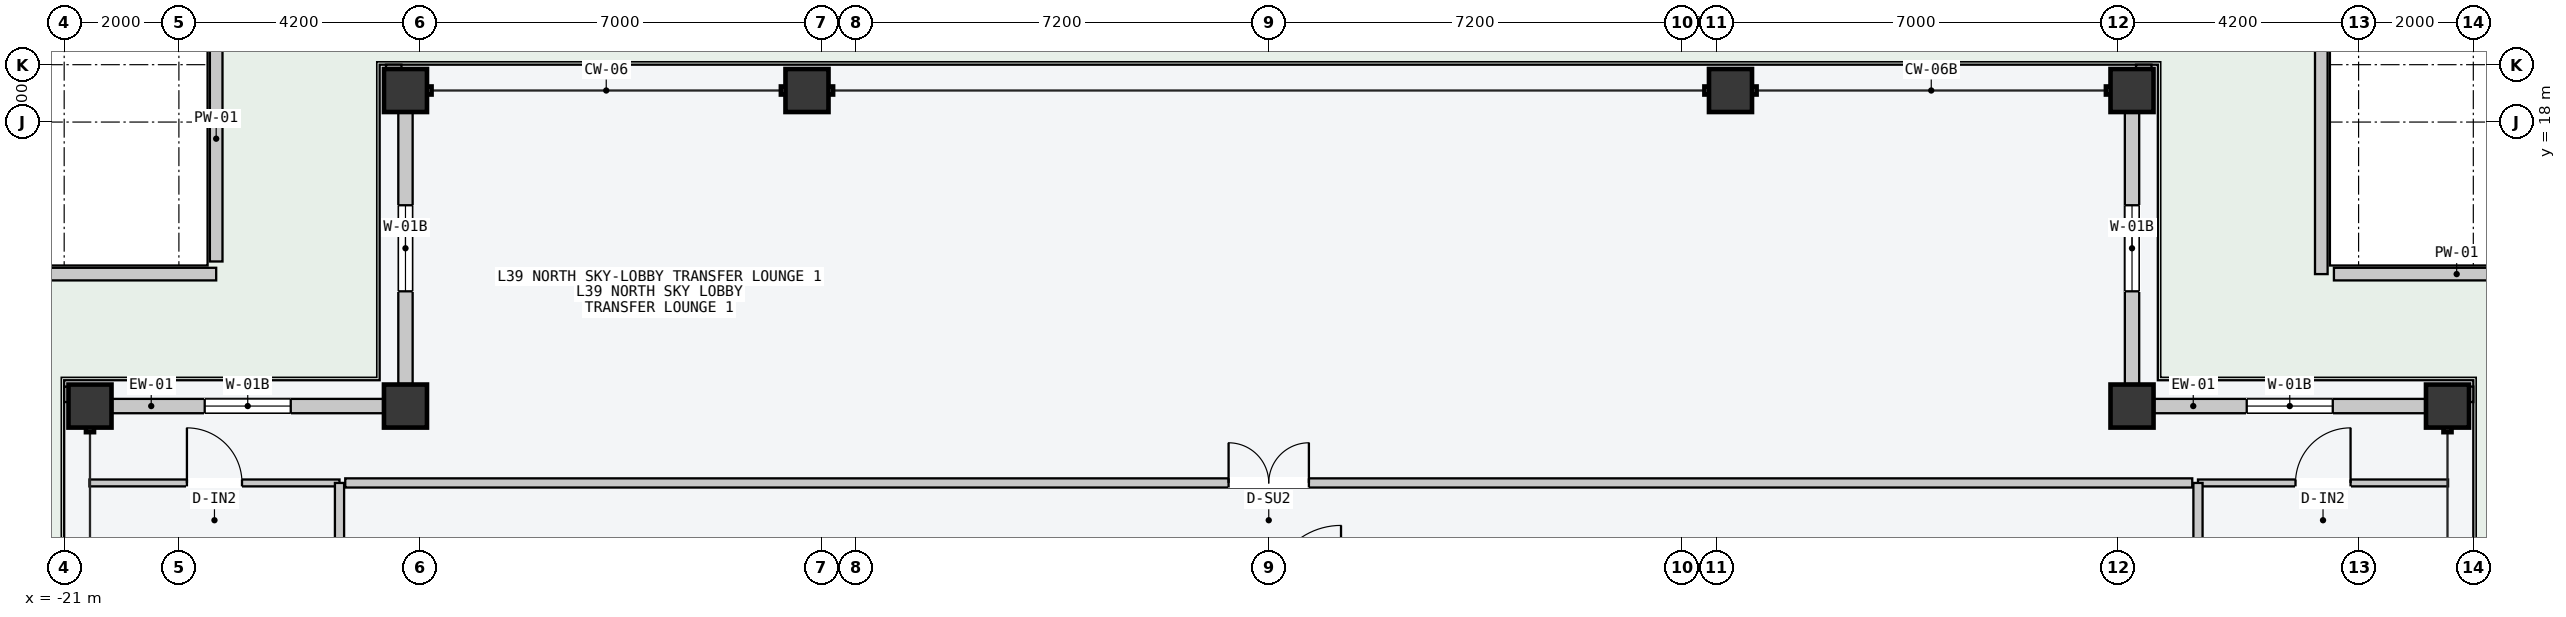
"""IFC4 building model, lengths in metres.
Left out: names, types, materials, properties, quantities, classifications, styles, units other than length and angle.
Written with IfcOpenShell. Run it as: python <this file> out.ifc"""

import sys

from ifc_helpers import new_model, si_unit, direction, frame, frame_2d, origin, origin_2d, place, context, subcontext, project, spatial, rectangle, hollow_rectangle, extrude, element, fill, save


model = new_model("IFC4")
c1 = context("Model", 3, precision=1e-05, world=origin(), true_north=direction((0.0, 1.0)))
c2 = subcontext(c1, "Body", "Model", "MODEL_VIEW")
j1 = project(units=[si_unit("LENGTHUNIT", "METRE"), si_unit("PLANEANGLEUNIT", "RADIAN")], contexts=[c1])
p1 = place(None, origin())
s1 = spatial("IfcSite", under=j1, at=p1, CompositionType="ELEMENT")
p2 = place(p1, origin())
s2 = spatial("IfcBuilding", under=s1, at=p2, CompositionType="ELEMENT")
p3 = place(p2, frame((0.0, 0.0, 150.6)))
s3 = spatial("IfcBuildingStorey", under=s2, at=p3, CompositionType="ELEMENT", Elevation=150.6)
for number, where, z_axis, x_axis in (
    (1, (-15.05, 18.55, -0.2), (0.0, 0.0, 1.0), (1.0, 0.0, 0.0)),
    (2, (-8.05, 18.55, -0.2), (0.0, 0.0, 1.0), (1.0, 0.0, 0.0)),
    (3, (8.05, 18.55, -0.2), (0.0, 0.0, 1.0), (1.0, 0.0, 0.0)),
    (4, (15.05, 18.55, -0.2), (0.0, 0.0, 1.0), (1.0, 0.0, 0.0)),
    (5, (-20.55, 13.05, -0.2), (0.0, 0.0, 1.0), (0.0, 1.0, 0.0)),
    (6, (20.55, 13.05, -0.2), (0.0, 0.0, 1.0), (0.0, 1.0, 0.0)),
    (7, (-15.05, 13.05, -0.2), (0.0, 0.0, 1.0), (1.0, 0.0, 0.0)),
    (8, (15.05, 13.05, -0.2), (0.0, 0.0, 1.0), (1.0, 0.0, 0.0)),
):
    element("IfcColumn", number, at=place(p3, frame(where, z_axis=z_axis, x_axis=x_axis)), inside=s3, PredefinedType="COLUMN", context=c2, shape_type="SweptSolid", body=[
        extrude(hollow_rectangle(XDim=0.75, YDim=0.75, WallThickness=0.032, at=origin_2d()), origin(), (0.0, 0.0, 1.0), 4.7),
    ])
p4 = place(p3, frame((-20.165, 13.05, 0.0), z_axis=(0.0, 0.0, 1.0), x_axis=(1.0, 0.0, 0.0)))
e9 = element("IfcWall", 9, at=p4, inside=s3, PredefinedType="STANDARD", context=c2, shape_type="SweptSolid", body=[
    extrude(rectangle(XDim=4.73, YDim=0.25, at=frame_2d((2.365, 0.0))), origin(), (0.0, 0.0, 1.0), 3.65),
])
p5 = place(p4, frame((1.615, 0.0, 0.85)))
e10 = element("IfcOpeningElement", 10, at=p5, cuts=e9, PredefinedType="OPENING", context=c2, shape_type="SweptSolid", body=[
    extrude(rectangle(XDim=1.5, YDim=1.95, at=frame_2d((0.75, 0.975))), frame((0.0, 0.135, 0.0), z_axis=(0.0, -1.0, 0.0), x_axis=(1.0, 0.0, 0.0)), (0.0, 0.0, 1.0), 0.27),
])
p6 = place(p3, frame((-15.05, 13.435, 0.0), z_axis=(0.0, 0.0, 1.0), x_axis=(0.0, 1.0, 0.0)))
e11 = element("IfcWall", 11, at=p6, inside=s3, PredefinedType="STANDARD", context=c2, shape_type="SweptSolid", body=[
    extrude(rectangle(XDim=4.73, YDim=0.25, at=frame_2d((2.365, 0.0))), origin(), (0.0, 0.0, 1.0), 3.65),
])
p7 = place(p6, frame((1.615, 0.0, 0.85)))
e12 = element("IfcOpeningElement", 12, at=p7, cuts=e11, PredefinedType="OPENING", context=c2, shape_type="SweptSolid", body=[
    extrude(rectangle(XDim=1.5, YDim=1.95, at=frame_2d((0.75, 0.975))), frame((0.0, 0.135, 0.0), z_axis=(0.0, -1.0, 0.0), x_axis=(1.0, 0.0, 0.0)), (0.0, 0.0, 1.0), 0.27),
])
p8 = place(p3, frame((15.435, 13.05, 0.0), z_axis=(0.0, 0.0, 1.0), x_axis=(1.0, 0.0, 0.0)))
e13 = element("IfcWall", 13, at=p8, inside=s3, PredefinedType="STANDARD", context=c2, shape_type="SweptSolid", body=[
    extrude(rectangle(XDim=4.73, YDim=0.25, at=frame_2d((2.365, 0.0))), origin(), (0.0, 0.0, 1.0), 3.65),
])
p9 = place(p8, frame((1.615, 0.0, 0.85)))
e14 = element("IfcOpeningElement", 14, at=p9, cuts=e13, PredefinedType="OPENING", context=c2, shape_type="SweptSolid", body=[
    extrude(rectangle(XDim=1.5, YDim=1.95, at=frame_2d((0.75, 0.975))), frame((0.0, 0.135, 0.0), z_axis=(0.0, -1.0, 0.0), x_axis=(1.0, 0.0, 0.0)), (0.0, 0.0, 1.0), 0.27),
])
p10 = place(p3, frame((15.05, 13.435, 0.0), z_axis=(0.0, 0.0, 1.0), x_axis=(0.0, 1.0, 0.0)))
e15 = element("IfcWall", 15, at=p10, inside=s3, PredefinedType="STANDARD", context=c2, shape_type="SweptSolid", body=[
    extrude(rectangle(XDim=4.73, YDim=0.25, at=frame_2d((2.365, 0.0))), origin(), (0.0, 0.0, 1.0), 3.65),
])
p11 = place(p10, frame((1.615, 0.0, 0.85)))
e16 = element("IfcOpeningElement", 16, at=p11, cuts=e15, PredefinedType="OPENING", context=c2, shape_type="SweptSolid", body=[
    extrude(rectangle(XDim=1.5, YDim=1.95, at=frame_2d((0.75, 0.975))), frame((0.0, 0.135, 0.0), z_axis=(0.0, -1.0, 0.0), x_axis=(1.0, 0.0, 0.0)), (0.0, 0.0, 1.0), 0.27),
])
for number, where, z_axis, x_axis in (
    (17, (-15.39, 18.89, 0.0), (0.0, 0.0, 1.0), (1.0, 0.0, 0.0)),
    (18, (-20.89, 13.12, 0.0), (0.0, 0.0, 1.0), (0.0, 1.0, 0.0)),
    (19, (15.12, 18.89, 0.0), (0.0, 0.0, 1.0), (1.0, 0.0, 0.0)),
    (20, (20.89, 13.12, 0.0), (0.0, 0.0, 1.0), (0.0, 1.0, 0.0)),
):
    element("IfcWall", number, at=place(p3, frame(where, z_axis=z_axis, x_axis=x_axis)), inside=s3, PredefinedType="PARAPET", context=c2, shape_type="SweptSolid", body=[
        extrude(rectangle(XDim=0.27, YDim=0.22, at=frame_2d((0.135, 0.0))), origin(), (0.0, 0.0, 1.0), 1.2),
    ])
p12 = place(p3, frame((22.85, 15.35, 0.0), z_axis=(0.0, 0.0, 1.0), x_axis=(-1.0, 0.0, 0.0)))
e21 = element("IfcWall", 21, at=p12, inside=s3, PredefinedType="PARAPET", context=c2, shape_type="SweptSolid", body=[
    extrude(rectangle(XDim=4.28, YDim=0.22, at=frame_2d((2.14, 0.0))), origin(), (0.0, 0.0, 1.0), 1.2),
])
p13 = place(p3, frame((18.35, 15.35, 0.0), z_axis=(0.0, 0.0, 1.0), x_axis=(0.0, 1.0, 0.0)))
e22 = element("IfcWall", 22, at=p13, inside=s3, PredefinedType="PARAPET", context=c2, shape_type="SweptSolid", body=[
    extrude(rectangle(XDim=4.28, YDim=0.22, at=frame_2d((2.14, 0.0))), origin(), (0.0, 0.0, 1.0), 1.2),
])
p14 = place(p3, frame((-18.35, 19.85, 0.0), z_axis=(0.0, 0.0, 1.0), x_axis=(0.0, -1.0, 0.0)))
e23 = element("IfcWall", 23, at=p14, inside=s3, PredefinedType="PARAPET", context=c2, shape_type="SweptSolid", body=[
    extrude(rectangle(XDim=4.28, YDim=0.22, at=frame_2d((2.14, 0.0))), origin(), (0.0, 0.0, 1.0), 1.2),
])
p15 = place(p3, frame((-18.35, 15.35, 0.0), z_axis=(0.0, 0.0, 1.0), x_axis=(-1.0, 0.0, 0.0)))
e24 = element("IfcWall", 24, at=p15, inside=s3, PredefinedType="PARAPET", context=c2, shape_type="SweptSolid", body=[
    extrude(rectangle(XDim=4.28, YDim=0.22, at=frame_2d((2.14, 0.0))), origin(), (0.0, 0.0, 1.0), 1.2),
])
p16 = place(p3, frame((-16.1, 11.71, 0.0), z_axis=(0.0, 0.0, 1.0), x_axis=(1.0, 0.0, 0.0)))
e25 = element("IfcWall", 25, at=p16, inside=s3, PredefinedType="PARTITIONING", context=c2, shape_type="SweptSolid", body=[
    extrude(rectangle(XDim=32.2, YDim=0.16, at=frame_2d((16.1, 0.0))), origin(), (0.0, 0.0, 1.0), 4.3),
])
p17 = place(p16, frame((15.4, 0.0, 0.0)))
e26 = element("IfcOpeningElement", 26, at=p17, cuts=e25, PredefinedType="OPENING", context=c2, shape_type="SweptSolid", body=[
    extrude(rectangle(XDim=1.4, YDim=2.2, at=frame_2d((0.7, 1.1))), frame((0.0, 0.09, 0.0), z_axis=(0.0, -1.0, 0.0), x_axis=(1.0, 0.0, 0.0)), (0.0, 0.0, 1.0), 0.18),
])
p18 = place(p3, frame((-20.56, 11.71, 0.0), z_axis=(0.0, 0.0, 1.0), x_axis=(1.0, 0.0, 0.0)))
e27 = element("IfcWall", 27, at=p18, inside=s3, PredefinedType="PARTITIONING", context=c2, shape_type="SweptSolid", body=[
    extrude(rectangle(XDim=4.36, YDim=0.12, at=frame_2d((2.18, 0.0))), origin(), (0.0, 0.0, 1.0), 4.3),
])
p19 = place(p18, frame((1.7, 0.0, 0.0)))
e28 = element("IfcOpeningElement", 28, at=p19, cuts=e27, PredefinedType="OPENING", context=c2, shape_type="SweptSolid", body=[
    extrude(rectangle(XDim=0.96, YDim=2.18, at=frame_2d((0.48, 1.09))), frame((0.0, 0.07, 0.0), z_axis=(0.0, -1.0, 0.0), x_axis=(1.0, 0.0, 0.0)), (0.0, 0.0, 1.0), 0.14),
])
p20 = place(p3, frame((16.2, 11.71, 0.0), z_axis=(0.0, 0.0, 1.0), x_axis=(1.0, 0.0, 0.0)))
e29 = element("IfcWall", 29, at=p20, inside=s3, PredefinedType="PARTITIONING", context=c2, shape_type="SweptSolid", body=[
    extrude(rectangle(XDim=4.36, YDim=0.12, at=frame_2d((2.18, 0.0))), origin(), (0.0, 0.0, 1.0), 4.3),
])
p21 = place(p20, frame((1.7, 0.0, 0.0)))
e30 = element("IfcOpeningElement", 30, at=p21, cuts=e29, PredefinedType="OPENING", context=c2, shape_type="SweptSolid", body=[
    extrude(rectangle(XDim=0.96, YDim=2.18, at=frame_2d((0.48, 1.09))), frame((0.0, 0.07, 0.0), z_axis=(0.0, -1.0, 0.0), x_axis=(1.0, 0.0, 0.0)), (0.0, 0.0, 1.0), 0.14),
])
for number, where, z_axis, x_axis in (
    (31, (-16.2, 9.76, 0.0), (0.0, 0.0, 1.0), (0.0, 1.0, 0.0)),
    (32, (16.2, 9.76, 0.0), (0.0, 0.0, 1.0), (0.0, 1.0, 0.0)),
):
    element("IfcWall", number, at=place(p3, frame(where, z_axis=z_axis, x_axis=x_axis)), inside=s3, PredefinedType="PARTITIONING", context=c2, shape_type="SweptSolid", body=[
        extrude(rectangle(XDim=1.95, YDim=0.16, at=frame_2d((0.975, 0.0))), origin(), (0.0, 0.0, 1.0), 4.3),
    ])
p22 = place(p5, origin())
e33 = element("IfcWindow", 33, at=p22, inside=s3, PartitioningType="SINGLE_PANEL", PredefinedType="WINDOW", context=c2, shape_type="SweptSolid", body=[
    extrude(rectangle(XDim=1.5, YDim=1.95, at=frame_2d((0.75, 0.975))), frame((0.0, 0.03, 0.0), z_axis=(0.0, -1.0, 0.0), x_axis=(1.0, 0.0, 0.0)), (0.0, 0.0, 1.0), 0.06),
])
fill(e10, e33)
p23 = place(p7, origin())
e34 = element("IfcWindow", 34, at=p23, inside=s3, PartitioningType="SINGLE_PANEL", PredefinedType="WINDOW", context=c2, shape_type="SweptSolid", body=[
    extrude(rectangle(XDim=1.5, YDim=1.95, at=frame_2d((0.75, 0.975))), frame((0.0, 0.03, 0.0), z_axis=(0.0, -1.0, 0.0), x_axis=(1.0, 0.0, 0.0)), (0.0, 0.0, 1.0), 0.06),
])
fill(e12, e34)
p24 = place(p9, origin())
e35 = element("IfcWindow", 35, at=p24, inside=s3, PartitioningType="SINGLE_PANEL", PredefinedType="WINDOW", context=c2, shape_type="SweptSolid", body=[
    extrude(rectangle(XDim=1.5, YDim=1.95, at=frame_2d((0.75, 0.975))), frame((0.0, 0.03, 0.0), z_axis=(0.0, -1.0, 0.0), x_axis=(1.0, 0.0, 0.0)), (0.0, 0.0, 1.0), 0.06),
])
fill(e14, e35)
p25 = place(p11, origin())
e36 = element("IfcWindow", 36, at=p25, inside=s3, PartitioningType="SINGLE_PANEL", PredefinedType="WINDOW", context=c2, shape_type="SweptSolid", body=[
    extrude(rectangle(XDim=1.5, YDim=1.95, at=frame_2d((0.75, 0.975))), frame((0.0, 0.03, 0.0), z_axis=(0.0, -1.0, 0.0), x_axis=(1.0, 0.0, 0.0)), (0.0, 0.0, 1.0), 0.06),
])
fill(e16, e36)
p26 = place(p17, origin())
e37 = element("IfcDoor", 37, at=p26, inside=s3, OperationType="DOUBLE_DOOR_SINGLE_SWING", PredefinedType="DOOR", context=c2, shape_type="SweptSolid", body=[
    extrude(rectangle(XDim=1.4, YDim=2.2, at=frame_2d((0.7, 1.1))), frame((0.0, 0.025, 0.0), z_axis=(0.0, -1.0, 0.0), x_axis=(1.0, 0.0, 0.0)), (0.0, 0.0, 1.0), 0.05),
])
fill(e26, e37)
p27 = place(p19, origin())
e38 = element("IfcDoor", 38, at=p27, inside=s3, OperationType="SINGLE_SWING_LEFT", PredefinedType="DOOR", context=c2, shape_type="SweptSolid", body=[
    extrude(rectangle(XDim=0.96, YDim=2.18, at=frame_2d((0.48, 1.09))), frame((0.0, 0.025, 0.0), z_axis=(0.0, -1.0, 0.0), x_axis=(1.0, 0.0, 0.0)), (0.0, 0.0, 1.0), 0.05),
])
fill(e28, e38)
p28 = place(p21, origin())
e39 = element("IfcDoor", 39, at=p28, inside=s3, OperationType="SINGLE_SWING_RIGHT", PredefinedType="DOOR", context=c2, shape_type="SweptSolid", body=[
    extrude(rectangle(XDim=0.96, YDim=2.18, at=frame_2d((0.48, 1.09))), frame((0.0, 0.025, 0.0), z_axis=(0.0, -1.0, 0.0), x_axis=(1.0, 0.0, 0.0)), (0.0, 0.0, 1.0), 0.05),
])
fill(e30, e39)
save(model, sys.argv[1])
